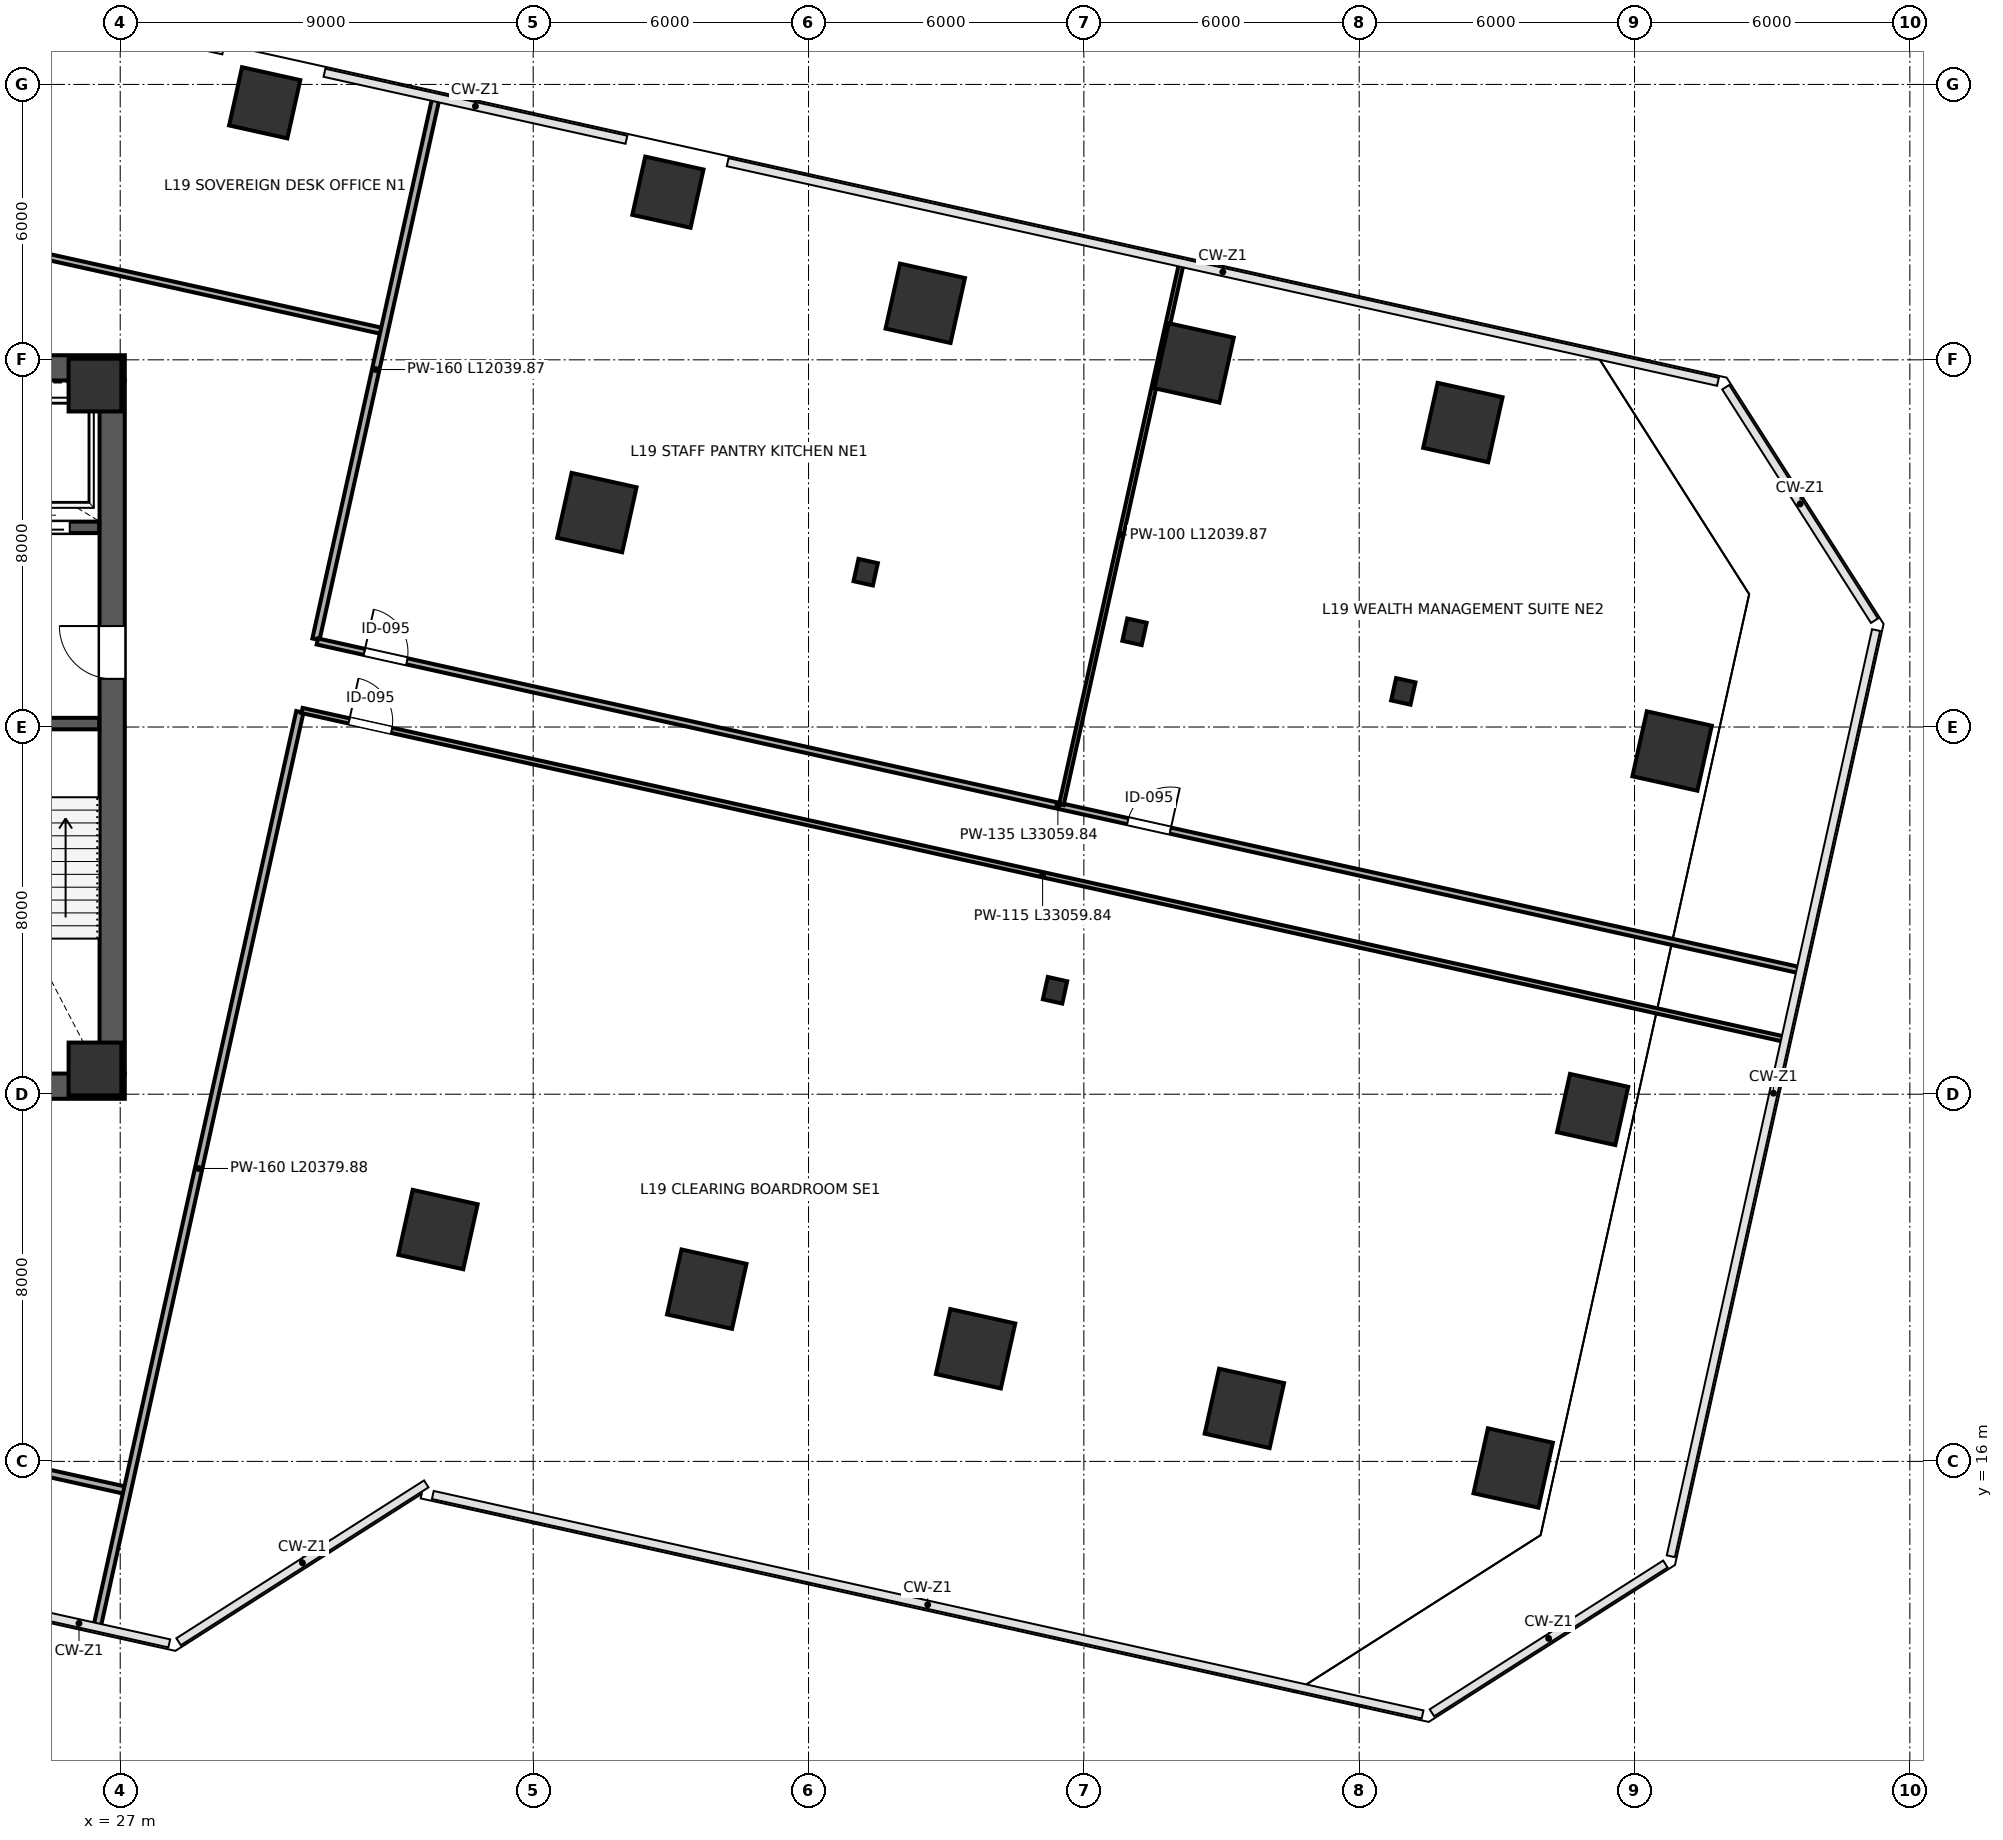
"""IFC4 building model, lengths in metres.
Left out: names, types, materials, properties, quantities, classifications, styles, units other than length and angle.
Written with IfcOpenShell. Run it as: python <this file> out.ifc"""

import sys

from ifc_helpers import new_model, si_unit, direction, frame, frame_2d, origin, origin_2d, place, context, subcontext, project, spatial, rectangle, i_section, extrude, source, transform, mapped, element, fill, save


model = new_model("IFC4")
c1 = context("Model", 3, precision=1e-05, world=origin(), true_north=direction((0.0, 1.0)))
c2 = subcontext(c1, "Body", "Model", "MODEL_VIEW")
j1 = project(units=[si_unit("LENGTHUNIT", "METRE"), si_unit("PLANEANGLEUNIT", "RADIAN")], contexts=[c1])
p1 = place(None, origin())
s1 = spatial("IfcSite", under=j1, at=p1, CompositionType="ELEMENT")
p2 = place(p1, origin())
s2 = spatial("IfcBuilding", under=s1, at=p2, CompositionType="ELEMENT")
p3 = place(p2, frame((0.0, 0.0, 87.4)))
s3 = spatial("IfcBuildingStorey", under=s2, at=p3, CompositionType="ELEMENT", Elevation=87.4)
m1 = source(origin(), c2, "Body", "SweptSolid", [
    extrude(rectangle(XDim=1.15, YDim=1.15, at=origin_2d()), origin(), (0.0, 0.0, 1.0), 4.199),
])
for number, where, z_axis, x_axis in (
    (1, (26.45, 24.55, 0.001), (0.0, 0.0, 1.0), (1.0, 0.0, 0.0)),
    (2, (26.45, 39.45, 0.001), (0.0, 0.0, 1.0), (1.0, 0.0, 0.0)),
):
    element("IfcColumn", number, at=place(p3, frame(where, z_axis=z_axis, x_axis=x_axis)), inside=s3, PredefinedType="COLUMN", context=c2, shape_type="MappedRepresentation", body=[
        mapped(m1, transform((0.0, 0.0, 0.0), scale=1.0)),
    ])
m2 = source(origin(), c2, "Body", "SweptSolid", [
    extrude(rectangle(XDim=1.3, YDim=1.3, at=origin_2d()), origin(), (0.0, 0.0, 1.0), 4.199),
])
p4 = place(p3, frame((30.149, 45.601, 0.001), z_axis=(0.0, 0.0, 1.0), x_axis=(-0.97629600712, 0.216439613938, 0.0)))
e3 = element("IfcColumn", 3, at=p4, inside=s3, PredefinedType="COLUMN", context=c2, shape_type="MappedRepresentation", body=[
    mapped(m2, transform((0.0, 0.0, 0.0), scale=1.0)),
])
m3 = source(origin(), c2, "Body", "SweptSolid", [
    extrude(rectangle(XDim=1.45, YDim=1.45, at=origin_2d()), origin(), (0.0, 0.0, 1.0), 4.199),
])
for number, where, z_axis, x_axis in (
    (4, (33.925, 21.051, 0.001), (0.0, 0.0, 1.0), (-0.976, 0.216, 0.0)),
    (5, (37.388, 36.672, 0.001), (0.0, 0.0, 1.0), (-0.976, 0.216, 0.0)),
):
    element("IfcColumn", number, at=place(p3, frame(where, z_axis=z_axis, x_axis=x_axis)), inside=s3, PredefinedType="COLUMN", context=c2, shape_type="MappedRepresentation", body=[
        mapped(m3, transform((0.0, 0.0, 0.0), scale=1.0)),
    ])
p5 = place(p3, frame((38.935, 43.653, 0.001), z_axis=(0.0, 0.0, 1.0), x_axis=(-0.97629600712, 0.216439613938, 0.0)))
e6 = element("IfcColumn", 6, at=p5, inside=s3, PredefinedType="COLUMN", context=c2, shape_type="MappedRepresentation", body=[
    mapped(m2, transform((0.0, 0.0, 0.0), scale=1.0)),
])
p6 = place(p3, frame((39.783, 19.753, 0.001), z_axis=(0.0, 0.0, 1.0), x_axis=(-0.97629600712, 0.216439613938, 0.0)))
e7 = element("IfcColumn", 7, at=p6, inside=s3, PredefinedType="COLUMN", context=c2, shape_type="MappedRepresentation", body=[
    mapped(m3, transform((0.0, 0.0, 0.0), scale=1.0)),
])
m4 = source(origin(), c2, "Body", "SweptSolid", [
    extrude(i_section(OverallWidth=0.432, OverallDepth=0.498, WebThickness=0.056, FlangeThickness=0.089, FilletRadius=0.015, at=origin_2d()), origin(), (0.0, 0.0, 1.0), 4.199),
])
p7 = place(p3, frame((43.246, 35.373, 0.001), z_axis=(0.0, 0.0, 1.0), x_axis=(-0.97629600712, 0.216439613938, 0.0)))
e8 = element("IfcColumn", 8, at=p7, inside=s3, PredefinedType="COLUMN", context=c2, shape_type="MappedRepresentation", body=[
    mapped(m4, transform((0.0, 0.0, 0.0), scale=1.0)),
])
for number, where, z_axis, x_axis in (
    (9, (44.544, 41.231, 0.001), (0.0, 0.0, 1.0), (-0.976, 0.216, 0.0)),
    (10, (45.64, 18.454, 0.001), (0.0, 0.0, 1.0), (-0.976, 0.216, 0.0)),
):
    element("IfcColumn", number, at=place(p3, frame(where, z_axis=z_axis, x_axis=x_axis)), inside=s3, PredefinedType="COLUMN", context=c2, shape_type="MappedRepresentation", body=[
        mapped(m3, transform((0.0, 0.0, 0.0), scale=1.0)),
    ])
for number, where, z_axis, x_axis in (
    (11, (47.372, 26.264, 0.001), (0.0, 0.0, 1.0), (-0.976, 0.216, 0.0)),
    (12, (49.104, 34.075, 0.001), (0.0, 0.0, 1.0), (-0.976, 0.216, 0.0)),
):
    element("IfcColumn", number, at=place(p3, frame(where, z_axis=z_axis, x_axis=x_axis)), inside=s3, PredefinedType="COLUMN", context=c2, shape_type="MappedRepresentation", body=[
        mapped(m4, transform((0.0, 0.0, 0.0), scale=1.0)),
    ])
for number, where, z_axis, x_axis in (
    (13, (50.402, 39.933, 0.001), (0.0, 0.0, 1.0), (-0.976, 0.216, 0.0)),
    (14, (51.498, 17.155, 0.001), (0.0, 0.0, 1.0), (-0.976, 0.216, 0.0)),
):
    element("IfcColumn", number, at=place(p3, frame(where, z_axis=z_axis, x_axis=x_axis)), inside=s3, PredefinedType="COLUMN", context=c2, shape_type="MappedRepresentation", body=[
        mapped(m3, transform((0.0, 0.0, 0.0), scale=1.0)),
    ])
p8 = place(p3, frame((54.961, 32.776, 0.001), z_axis=(0.0, 0.0, 1.0), x_axis=(-0.97629600712, 0.216439613938, 0.0)))
e15 = element("IfcColumn", 15, at=p8, inside=s3, PredefinedType="COLUMN", context=c2, shape_type="MappedRepresentation", body=[
    mapped(m4, transform((0.0, 0.0, 0.0), scale=1.0)),
])
p9 = place(p3, frame((56.26, 38.634, 0.001), z_axis=(0.0, 0.0, 1.0), x_axis=(-0.97629600712, 0.216439613938, 0.0)))
e16 = element("IfcColumn", 16, at=p9, inside=s3, PredefinedType="COLUMN", context=c2, shape_type="MappedRepresentation", body=[
    mapped(m3, transform((0.0, 0.0, 0.0), scale=1.0)),
])
m5 = source(origin(), c2, "Body", "SweptSolid", [
    extrude(rectangle(XDim=1.45, YDim=1.45, at=origin_2d()), origin(), (0.0, 0.0, 1.0), 4.199),
])
p10 = place(p3, frame((57.356, 15.857, 0.001), z_axis=(0.0, 0.0, 1.0), x_axis=(-0.97629600712, 0.216439613938, 0.0)))
e17 = element("IfcColumn", 17, at=p10, inside=s3, PredefinedType="COLUMN", context=c2, shape_type="MappedRepresentation", body=[
    mapped(m5, transform((0.0, 0.0, 0.0), scale=1.0)),
])
p11 = place(p3, frame((59.087, 23.667, 0.001), z_axis=(0.0, 0.0, 1.0), x_axis=(-0.97629600712, 0.216439613938, 0.0)))
e18 = element("IfcColumn", 18, at=p11, inside=s3, PredefinedType="COLUMN", context=c2, shape_type="MappedRepresentation", body=[
    mapped(m2, transform((0.0, 0.0, 0.0), scale=1.0)),
])
p12 = place(p3, frame((60.819, 31.477, 0.001), z_axis=(0.0, 0.0, 1.0), x_axis=(-0.97629600712, 0.216439613938, 0.0)))
e19 = element("IfcColumn", 19, at=p12, inside=s3, PredefinedType="COLUMN", context=c2, shape_type="MappedRepresentation", body=[
    mapped(m5, transform((0.0, 0.0, 0.0), scale=1.0)),
])
p13 = place(p3, frame((26.825, 24.45, 0.0), z_axis=(0.0, 0.0, 1.0), x_axis=(0.0, 1.0, 0.0)))
e20 = element("IfcWall", 20, at=p13, inside=s3, PredefinedType="SHEAR", context=c2, shape_type="SweptSolid", body=[
    extrude(rectangle(XDim=15.1, YDim=0.55, at=frame_2d((7.55, 0.0))), origin(), (0.0, 0.0, 1.0), 3.96),
])
p14 = place(p13, frame((8.6, 0.0, 0.0)))
e21 = element("IfcOpeningElement", 21, at=p14, cuts=e20, PredefinedType="OPENING", context=c2, shape_type="SweptSolid", body=[
    extrude(rectangle(XDim=1.15, YDim=2.2, at=frame_2d((0.575, 1.1))), frame((0.0, 0.285, 0.0), z_axis=(0.0, -1.0, 0.0), x_axis=(1.0, 0.0, 0.0)), (0.0, 0.0, 1.0), 0.57),
])
for number, where, z_axis, x_axis in (
    (22, (8.9, 24.175, 0.0), (0.0, 0.0, 1.0), (1.0, 0.0, 0.0)),
    (23, (8.9, 39.825, 0.0), (0.0, 0.0, 1.0), (1.0, 0.0, 0.0)),
):
    element("IfcWall", number, at=place(p3, frame(where, z_axis=z_axis, x_axis=x_axis)), inside=s3, PredefinedType="SHEAR", context=c2, shape_type="SweptSolid", body=[
        extrude(rectangle(XDim=18.2, YDim=0.55, at=frame_2d((9.1, 0.0))), origin(), (0.0, 0.0, 1.0), 3.96),
    ])
p15 = place(p3, frame((23.19, 32.075, 0.0), z_axis=(0.0, 0.0, 1.0), x_axis=(1.0, 0.0, 0.0)))
e24 = element("IfcWall", 24, at=p15, inside=s3, PredefinedType="SHEAR", context=c2, shape_type="SweptSolid", body=[
    extrude(rectangle(XDim=3.35, YDim=0.25, at=frame_2d((1.675, 0.0))), origin(), (0.0, 0.0, 1.0), 3.96),
])
p16 = place(p15, frame((0.85, 0.0, 0.0)))
e25 = element("IfcOpeningElement", 25, at=p16, cuts=e24, PredefinedType="OPENING", context=c2, shape_type="SweptSolid", body=[
    extrude(rectangle(XDim=1.15, YDim=2.2, at=frame_2d((0.575, 1.1))), frame((0.0, 0.135, 0.0), z_axis=(0.0, -1.0, 0.0), x_axis=(1.0, 0.0, 0.0)), (0.0, 0.0, 1.0), 0.27),
])
p17 = place(p3, frame((21.45, 36.35, 0.0), z_axis=(0.0, 0.0, 1.0), x_axis=(1.0, 0.0, 0.0)))
e26 = element("IfcWall", 26, at=p17, inside=s3, PredefinedType="SHEAR", context=c2, shape_type="SweptSolid", body=[
    extrude(rectangle(XDim=5.09, YDim=0.25, at=frame_2d((2.545, 0.0))), origin(), (0.0, 0.0, 1.0), 3.96),
])
p18 = place(p17, frame((0.7, 0.0, 0.0)))
e27 = element("IfcOpeningElement", 27, at=p18, cuts=e26, PredefinedType="OPENING", context=c2, shape_type="SweptSolid", body=[
    extrude(rectangle(XDim=1.2, YDim=2.2, at=frame_2d((0.6, 1.1))), frame((0.0, 0.135, 0.0), z_axis=(0.0, -1.0, 0.0), x_axis=(1.0, 0.0, 0.0)), (0.0, 0.0, 1.0), 0.27),
])
p19 = place(p17, frame((3.25, 0.0, 0.0)))
e28 = element("IfcOpeningElement", 28, at=p19, cuts=e26, PredefinedType="OPENING", context=c2, shape_type="SweptSolid", body=[
    extrude(rectangle(XDim=1.2, YDim=2.2, at=frame_2d((0.6, 1.1))), frame((0.0, 0.135, 0.0), z_axis=(0.0, -1.0, 0.0), x_axis=(1.0, 0.0, 0.0)), (0.0, 0.0, 1.0), 0.27),
])
p20 = place(p3, frame((9.16, 19.351, 0.0), z_axis=(0.0, 0.0, 1.0), x_axis=(0.97629657883, -0.216437035106, 0.0)))
e29 = element("IfcWall", 29, at=p20, inside=s3, PredefinedType="PARTITIONING", context=c2, shape_type="SweptSolid", body=[
    extrude(rectangle(XDim=18.39, YDim=0.16, at=frame_2d((9.195, 0.0))), origin(), (0.0, 0.0, 1.0), 3.96),
])
p21 = place(p20, frame((1.45, 0.0, 0.0)))
e30 = element("IfcOpeningElement", 30, at=p21, cuts=e29, PredefinedType="OPENING", context=c2, shape_type="SweptSolid", body=[
    extrude(rectangle(XDim=0.95, YDim=2.15, at=frame_2d((0.475, 1.075))), frame((0.0, 0.09, 0.0), z_axis=(0.0, -1.0, 0.0), x_axis=(1.0, 0.0, 0.0)), (0.0, 0.0, 1.0), 0.18),
])
p22 = place(p3, frame((6.744, 46.385, 0.0), z_axis=(0.0, 0.0, 1.0), x_axis=(0.976297719541, -0.216431889561, 0.0)))
e31 = element("IfcWall", 31, at=p22, inside=s3, PredefinedType="PARTITIONING", context=c2, shape_type="SweptSolid", body=[
    extrude(rectangle(XDim=26.6, YDim=0.135, at=frame_2d((13.3, 0.0))), origin(), (0.0, 0.0, 1.0), 3.96),
])
p23 = place(p22, frame((0.91, 0.0, 0.0)))
e32 = element("IfcOpeningElement", 32, at=p23, cuts=e31, PredefinedType="OPENING", context=c2, shape_type="SweptSolid", body=[
    extrude(rectangle(XDim=0.95, YDim=2.15, at=frame_2d((0.475, 1.075))), frame((0.0, 0.078, 0.0), z_axis=(0.0, -1.0, 0.0), x_axis=(1.0, 0.0, 0.0)), (0.0, 0.0, 1.0), 0.155),
])
p24 = place(p3, frame((31.265, 33.912, 0.0), z_axis=(0.0, 0.0, 1.0), x_axis=(0.216425867349, 0.976299054564, 0.0)))
e33 = element("IfcWall", 33, at=p24, inside=s3, PredefinedType="PARTITIONING", context=c2, shape_type="SweptSolid", body=[
    extrude(rectangle(XDim=12.04, YDim=0.16, at=frame_2d((6.02, 0.0))), origin(), (0.0, 0.0, 1.0), 3.095),
])
p25 = place(p3, frame((26.504, 12.433, 0.0), z_axis=(0.0, 0.0, 1.0), x_axis=(0.216434476574, 0.976297146032, 0.0)))
e34 = element("IfcWall", 34, at=p25, inside=s3, PredefinedType="PARTITIONING", context=c2, shape_type="SweptSolid", body=[
    extrude(rectangle(XDim=20.38, YDim=0.16, at=frame_2d((10.19, 0.0))), origin(), (0.0, 0.0, 1.0), 3.96),
])
p26 = place(p3, frame((31.296, 33.864, 0.0), z_axis=(0.0, 0.0, 1.0), x_axis=(0.976295884124, -0.216440168738, 0.0)))
e35 = element("IfcWall", 35, at=p26, inside=s3, PredefinedType="PARTITIONING", context=c2, shape_type="SweptSolid", body=[
    extrude(rectangle(XDim=33.06, YDim=0.135, at=frame_2d((16.53, 0.0))), origin(), (0.0, 0.0, 1.0), 3.095),
])
p27 = place(p26, frame((1.05, 0.0, 0.0)))
e36 = element("IfcOpeningElement", 36, at=p27, cuts=e35, PredefinedType="OPENING", context=c2, shape_type="SweptSolid", body=[
    extrude(rectangle(XDim=0.95, YDim=2.15, at=frame_2d((0.475, 1.075))), frame((0.0, 0.078, 0.0), z_axis=(0.0, -1.0, 0.0), x_axis=(1.0, 0.0, 0.0)), (0.0, 0.0, 1.0), 0.155),
])
p28 = place(p26, frame((18.09, 0.0, 0.0)))
e37 = element("IfcOpeningElement", 37, at=p28, cuts=e35, PredefinedType="OPENING", context=c2, shape_type="SweptSolid", body=[
    extrude(rectangle(XDim=0.95, YDim=2.15, at=frame_2d((0.475, 1.075))), frame((0.0, 0.078, 0.0), z_axis=(0.0, -1.0, 0.0), x_axis=(1.0, 0.0, 0.0)), (0.0, 0.0, 1.0), 0.155),
])
p29 = place(p3, frame((30.962, 32.361, 0.0), z_axis=(0.0, 0.0, 1.0), x_axis=(0.976295538171, -0.216441729221, 0.0)))
e38 = element("IfcWall", 38, at=p29, inside=s3, PredefinedType="PARTITIONING", context=c2, shape_type="SweptSolid", body=[
    extrude(rectangle(XDim=33.06, YDim=0.115, at=frame_2d((16.53, 0.0))), origin(), (0.0, 0.0, 1.0), 3.095),
])
p30 = place(p29, frame((1.05, 0.0, 0.0)))
e39 = element("IfcOpeningElement", 39, at=p30, cuts=e38, PredefinedType="OPENING", context=c2, shape_type="SweptSolid", body=[
    extrude(rectangle(XDim=0.95, YDim=2.15, at=frame_2d((0.475, 1.075))), frame((0.0, 0.067, 0.0), z_axis=(0.0, -1.0, 0.0), x_axis=(1.0, 0.0, 0.0)), (0.0, 0.0, 1.0), 0.135),
])
p31 = place(p3, frame((47.511, 30.31, 0.0), z_axis=(0.0, 0.0, 1.0), x_axis=(0.216425867349, 0.976299054564, 0.0)))
e40 = element("IfcWall", 40, at=p31, inside=s3, PredefinedType="PARTITIONING", context=c2, shape_type="SweptSolid", body=[
    extrude(rectangle(XDim=12.04, YDim=0.1, at=frame_2d((6.02, 0.0))), origin(), (0.0, 0.0, 1.0), 3.323),
])
m6 = source(origin(), c2, "Body", "SweptSolid", [
    extrude(rectangle(XDim=1.15, YDim=2.2, at=frame_2d((0.575, 1.1))), frame((0.0, 0.025, 0.0), z_axis=(0.0, -1.0, 0.0), x_axis=(1.0, 0.0, 0.0)), (0.0, 0.0, 1.0), 0.05),
])
p32 = place(p14, origin())
e41 = element("IfcDoor", 41, at=p32, inside=s3, OperationType="SINGLE_SWING_RIGHT", PredefinedType="DOOR", context=c2, shape_type="MappedRepresentation", body=[
    mapped(m6, transform((0.0, 0.0, 0.0), scale=1.0)),
])
fill(e21, e41)
m7 = source(origin(), c2, "Body", "SweptSolid", [
    extrude(rectangle(XDim=1.2, YDim=2.2, at=frame_2d((0.6, 1.1))), frame((0.0, 0.025, 0.0), z_axis=(0.0, -1.0, 0.0), x_axis=(1.0, 0.0, 0.0)), (0.0, 0.0, 1.0), 0.05),
])
p33 = place(p19, origin())
e42 = element("IfcDoor", 42, at=p33, inside=s3, OperationType="SLIDING_TO_RIGHT", PredefinedType="DOOR", context=c2, shape_type="MappedRepresentation", body=[
    mapped(m7, transform((0.0, 0.0, 0.0), scale=1.0)),
])
fill(e28, e42)
m8 = source(origin(), c2, "Body", "SweptSolid", [
    extrude(rectangle(XDim=0.95, YDim=2.15, at=frame_2d((0.475, 1.075))), frame((0.0, 0.025, 0.0), z_axis=(0.0, -1.0, 0.0), x_axis=(1.0, 0.0, 0.0)), (0.0, 0.0, 1.0), 0.05),
])
p34 = place(p27, origin())
e43 = element("IfcDoor", 43, at=p34, inside=s3, OperationType="SINGLE_SWING_LEFT", PredefinedType="DOOR", context=c2, shape_type="MappedRepresentation", body=[
    mapped(m8, transform((0.0, 0.0, 0.0), scale=1.0)),
])
fill(e36, e43)
p35 = place(p28, origin())
e44 = element("IfcDoor", 44, at=p35, inside=s3, OperationType="SINGLE_SWING_RIGHT", PredefinedType="DOOR", context=c2, shape_type="MappedRepresentation", body=[
    mapped(m8, transform((0.0, 0.0, 0.0), scale=1.0)),
])
fill(e37, e44)
p36 = place(p30, origin())
e45 = element("IfcDoor", 45, at=p36, inside=s3, OperationType="SINGLE_SWING_LEFT", PredefinedType="DOOR", context=c2, shape_type="MappedRepresentation", body=[
    mapped(m8, transform((0.0, 0.0, 0.0), scale=1.0)),
])
fill(e39, e45)
save(model, sys.argv[1])
